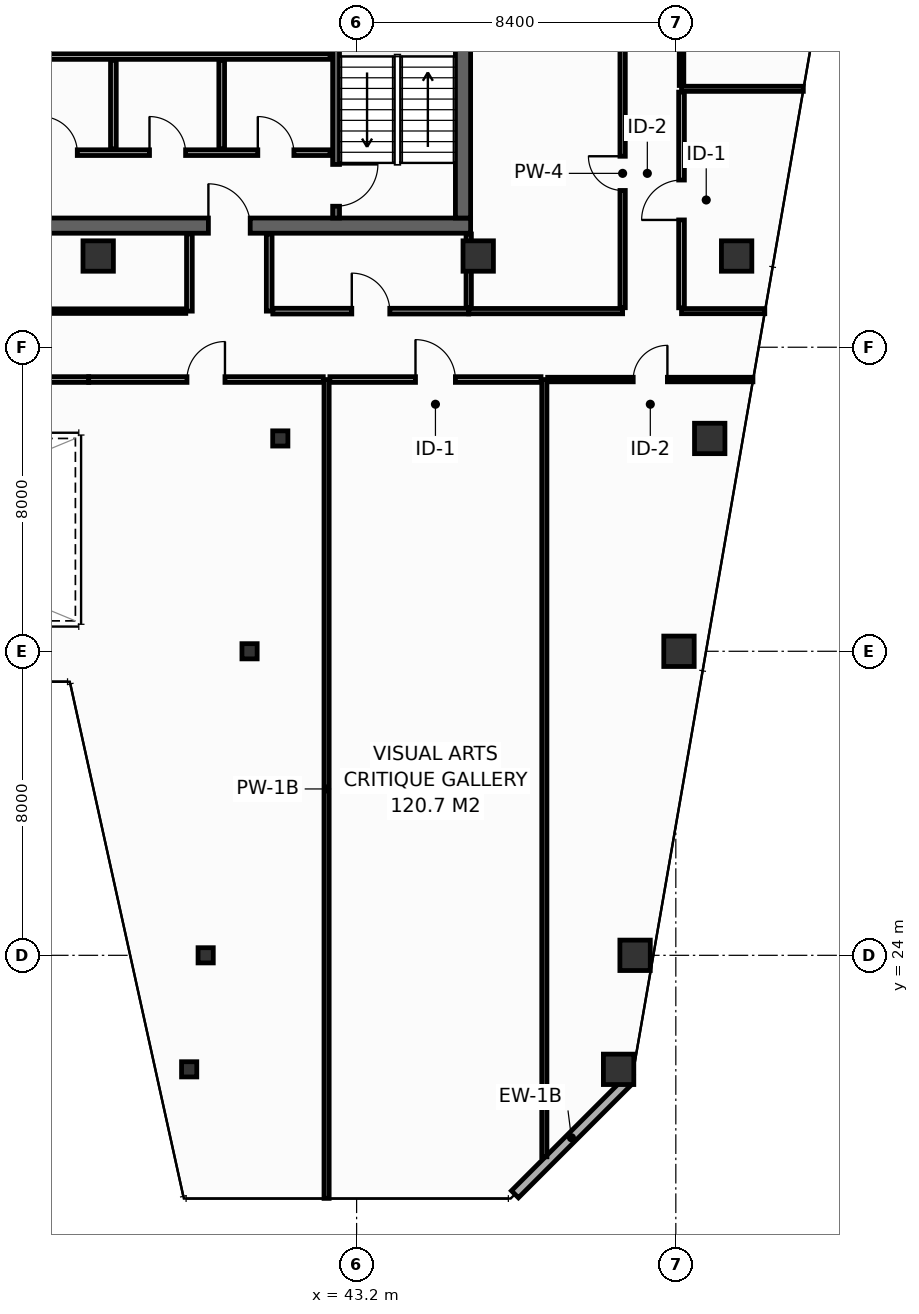
"""IFC4 building model, lengths in metres.
Left out: names, types, materials, properties, quantities, classifications, styles, units other than length and angle.
Written with IfcOpenShell. Run it as: python <this file> out.ifc"""

import sys

from ifc_helpers import new_model, si_unit, direction, frame, frame_2d, origin, origin_2d, place, context, subcontext, project, spatial, rectangle, hollow_rectangle, extrude, element, fill, save


model = new_model("IFC4")
c1 = context("Model", 3, precision=1e-05, world=origin(), true_north=direction((0.0, 1.0)))
c2 = subcontext(c1, "Body", "Model", "MODEL_VIEW")
j1 = project(units=[si_unit("LENGTHUNIT", "METRE"), si_unit("PLANEANGLEUNIT", "RADIAN")], contexts=[c1])
p1 = place(None, origin())
s1 = spatial("IfcSite", under=j1, at=p1, CompositionType="ELEMENT")
p2 = place(p1, origin())
s2 = spatial("IfcBuilding", under=s1, at=p2, CompositionType="ELEMENT")
p3 = place(p2, frame((0.0, 0.0, 234.4)))
s3 = spatial("IfcBuildingStorey", under=s2, at=p3, CompositionType="ELEMENT", Elevation=234.4)
p4 = place(p3, frame((13.7, 43.2, 0.0), z_axis=(0.0, 0.0, 1.0), x_axis=(1.0, 0.0, 0.0)))
e1 = element("IfcWall", 1, at=p4, inside=s3, PredefinedType="SHEAR", context=c2, shape_type="SweptSolid", body=[
    extrude(rectangle(XDim=32.5, YDim=0.4, at=frame_2d((16.25, 0.0))), origin(), (0.0, 0.0, 1.0), 3.55),
])
p5 = place(p4, frame((5.4, 0.0, 0.0)))
e2 = element("IfcOpeningElement", 2, at=p5, cuts=e1, PredefinedType="OPENING", context=c2, shape_type="SweptSolid", body=[
    extrude(rectangle(XDim=1.1, YDim=2.15, at=frame_2d((0.55, 1.075))), frame((0.0, 0.21, 0.0), z_axis=(0.0, -1.0, 0.0), x_axis=(1.0, 0.0, 0.0)), (0.0, 0.0, 1.0), 0.42),
])
p6 = place(p4, frame((25.6, 0.0, 0.0)))
e3 = element("IfcOpeningElement", 3, at=p6, cuts=e1, PredefinedType="OPENING", context=c2, shape_type="SweptSolid", body=[
    extrude(rectangle(XDim=1.1, YDim=2.15, at=frame_2d((0.55, 1.075))), frame((0.0, 0.21, 0.0), z_axis=(0.0, -1.0, 0.0), x_axis=(1.0, 0.0, 0.0)), (0.0, 0.0, 1.0), 0.42),
])
p7 = place(p3, frame((46.0, 43.4, 0.0), z_axis=(0.0, 0.0, 1.0), x_axis=(0.0, 1.0, 0.0)))
e4 = element("IfcWall", 4, at=p7, inside=s3, PredefinedType="SHEAR", context=c2, shape_type="SweptSolid", body=[
    extrude(rectangle(XDim=10.4, YDim=0.4, at=frame_2d((5.2, 0.0))), origin(), (0.0, 0.0, 1.0), 3.55),
])
for number, where, z_axis, x_axis in (
    (5, (36.4, 42.4, 0.0), (0.0, 0.0, 1.0), (1.0, 0.0, 0.0)),
    (6, (46.4, 42.4, 0.0), (0.0, 0.0, 1.0), (1.0, 0.0, 0.0)),
    (7, (53.2, 42.4, 0.0), (0.0, 0.0, 1.0), (1.0, 0.0, 0.0)),
    (8, (50.094, 21.0, 0.0), (0.0, 0.0, 1.0), (1.0, 0.0, 0.0)),
):
    element("IfcColumn", number, at=place(p3, frame(where, z_axis=z_axis, x_axis=x_axis)), inside=s3, PredefinedType="COLUMN", context=c2, shape_type="SweptSolid", body=[
        extrude(hollow_rectangle(XDim=0.8, YDim=0.8, WallThickness=0.036, at=origin_2d()), origin(), (0.0, 0.0, 1.0), 3.8),
    ])
p8 = place(p3, frame((38.794, 21.0, 0.0), z_axis=(0.0, 0.0, 1.0), x_axis=(1.0, 0.0, 0.0)))
e9 = element("IfcColumn", 9, at=p8, inside=s3, PredefinedType="COLUMN", context=c2, shape_type="SweptSolid", body=[
    extrude(hollow_rectangle(XDim=0.4, YDim=0.4, WallThickness=0.016, at=origin_2d()), origin(), (0.0, 0.0, 1.0), 3.8),
])
p9 = place(p3, frame((50.528, 24.0, 0.0), z_axis=(0.0, 0.0, 1.0), x_axis=(1.0, 0.0, 0.0)))
e10 = element("IfcColumn", 10, at=p9, inside=s3, PredefinedType="COLUMN", context=c2, shape_type="SweptSolid", body=[
    extrude(hollow_rectangle(XDim=0.8, YDim=0.8, WallThickness=0.036, at=origin_2d()), origin(), (0.0, 0.0, 1.0), 3.8),
])
p10 = place(p3, frame((39.228, 24.0, 0.0), z_axis=(0.0, 0.0, 1.0), x_axis=(1.0, 0.0, 0.0)))
e11 = element("IfcColumn", 11, at=p10, inside=s3, PredefinedType="COLUMN", context=c2, shape_type="SweptSolid", body=[
    extrude(hollow_rectangle(XDim=0.4, YDim=0.4, WallThickness=0.016, at=origin_2d()), origin(), (0.0, 0.0, 1.0), 3.8),
])
p11 = place(p3, frame((51.683, 32.0, 0.0), z_axis=(0.0, 0.0, 1.0), x_axis=(1.0, 0.0, 0.0)))
e12 = element("IfcColumn", 12, at=p11, inside=s3, PredefinedType="COLUMN", context=c2, shape_type="SweptSolid", body=[
    extrude(hollow_rectangle(XDim=0.8, YDim=0.8, WallThickness=0.036, at=origin_2d()), origin(), (0.0, 0.0, 1.0), 3.8),
])
p12 = place(p3, frame((40.383, 32.0, 0.0), z_axis=(0.0, 0.0, 1.0), x_axis=(1.0, 0.0, 0.0)))
e13 = element("IfcColumn", 13, at=p12, inside=s3, PredefinedType="COLUMN", context=c2, shape_type="SweptSolid", body=[
    extrude(hollow_rectangle(XDim=0.4, YDim=0.4, WallThickness=0.016, at=origin_2d()), origin(), (0.0, 0.0, 1.0), 3.8),
])
p13 = place(p3, frame((52.492, 37.6, 0.0), z_axis=(0.0, 0.0, 1.0), x_axis=(1.0, 0.0, 0.0)))
e14 = element("IfcColumn", 14, at=p13, inside=s3, PredefinedType="COLUMN", context=c2, shape_type="SweptSolid", body=[
    extrude(hollow_rectangle(XDim=0.8, YDim=0.8, WallThickness=0.036, at=origin_2d()), origin(), (0.0, 0.0, 1.0), 3.8),
])
p14 = place(p3, frame((41.192, 37.6, 0.0), z_axis=(0.0, 0.0, 1.0), x_axis=(1.0, 0.0, 0.0)))
e15 = element("IfcColumn", 15, at=p14, inside=s3, PredefinedType="COLUMN", context=c2, shape_type="SweptSolid", body=[
    extrude(hollow_rectangle(XDim=0.4, YDim=0.4, WallThickness=0.016, at=origin_2d()), origin(), (0.0, 0.0, 1.0), 3.8),
])
p15 = place(p3, frame((42.66, 53.8, 0.0), z_axis=(0.0, 0.0, 1.0), x_axis=(0.0, -1.0, 0.0)))
e16 = element("IfcWall", 16, at=p15, inside=s3, PredefinedType="SHEAR", context=c2, shape_type="SweptSolid", body=[
    extrude(rectangle(XDim=10.4, YDim=0.18, at=frame_2d((5.2, 0.0))), origin(), (0.0, 0.0, 1.0), 3.55),
])
p16 = place(p15, frame((8.99, 0.0, 0.0)))
e17 = element("IfcOpeningElement", 17, at=p16, cuts=e16, PredefinedType="OPENING", context=c2, shape_type="SweptSolid", body=[
    extrude(rectangle(XDim=1.1, YDim=2.15, at=frame_2d((0.55, 1.075))), frame((0.0, 0.1, 0.0), z_axis=(0.0, -1.0, 0.0), x_axis=(1.0, 0.0, 0.0)), (0.0, 0.0, 1.0), 0.2),
])
p17 = place(p3, frame((33.95, 45.12, 0.0), z_axis=(0.0, 0.0, 1.0), x_axis=(1.0, 0.0, 0.0)))
e18 = element("IfcWall", 18, at=p17, inside=s3, PredefinedType="PARTITIONING", context=c2, shape_type="SweptSolid", body=[
    extrude(rectangle(XDim=8.55, YDim=0.15, at=frame_2d((4.275, 0.0))), origin(), (0.0, 0.0, 1.0), 3.55),
])
p18 = place(p17, frame((0.95, 0.0, 0.0)))
e19 = element("IfcOpeningElement", 19, at=p18, cuts=e18, PredefinedType="OPENING", context=c2, shape_type="SweptSolid", body=[
    extrude(rectangle(XDim=0.95, YDim=2.15, at=frame_2d((0.475, 1.075))), frame((0.0, 0.085, 0.0), z_axis=(0.0, -1.0, 0.0), x_axis=(1.0, 0.0, 0.0)), (0.0, 0.0, 1.0), 0.17),
])
p19 = place(p17, frame((3.8, 0.0, 0.0)))
e20 = element("IfcOpeningElement", 20, at=p19, cuts=e18, PredefinedType="OPENING", context=c2, shape_type="SweptSolid", body=[
    extrude(rectangle(XDim=0.95, YDim=2.15, at=frame_2d((0.475, 1.075))), frame((0.0, 0.085, 0.0), z_axis=(0.0, -1.0, 0.0), x_axis=(1.0, 0.0, 0.0)), (0.0, 0.0, 1.0), 0.17),
])
p20 = place(p17, frame((6.65, 0.0, 0.0)))
e21 = element("IfcOpeningElement", 21, at=p20, cuts=e18, PredefinedType="OPENING", context=c2, shape_type="SweptSolid", body=[
    extrude(rectangle(XDim=0.95, YDim=2.15, at=frame_2d((0.475, 1.075))), frame((0.0, 0.085, 0.0), z_axis=(0.0, -1.0, 0.0), x_axis=(1.0, 0.0, 0.0)), (0.0, 0.0, 1.0), 0.17),
])
p21 = place(p3, frame((33.95, 47.65, 0.0), z_axis=(0.0, 0.0, 1.0), x_axis=(1.0, 0.0, 0.0)))
e22 = element("IfcWall", 22, at=p21, inside=s3, PredefinedType="PARTITIONING", context=c2, shape_type="SweptSolid", body=[
    extrude(rectangle(XDim=8.55, YDim=0.15, at=frame_2d((4.275, 0.0))), origin(), (0.0, 0.0, 1.0), 3.55),
])
for number, where, z_axis, x_axis in (
    (23, (36.8, 45.22, 0.0), (0.0, 0.0, 1.0), (0.0, 1.0, 0.0)),
    (24, (39.65, 45.22, 0.0), (0.0, 0.0, 1.0), (0.0, 1.0, 0.0)),
):
    element("IfcWall", number, at=place(p3, frame(where, z_axis=z_axis, x_axis=x_axis)), inside=s3, PredefinedType="PARTITIONING", context=c2, shape_type="SweptSolid", body=[
        extrude(rectangle(XDim=2.33, YDim=0.15, at=frame_2d((1.165, 0.0))), origin(), (0.0, 0.0, 1.0), 3.55),
    ])
p22 = place(p3, frame((47.366, 17.713, 0.0), z_axis=(0.0, 0.0, 1.0), x_axis=(0.70707775441, 0.707135806771, 0.0)))
e25 = element("IfcWall", 25, at=p22, inside=s3, PredefinedType="STANDARD", context=c2, shape_type="SweptSolid", body=[
    extrude(rectangle(XDim=4.206, YDim=0.26, at=frame_2d((2.103, 0.0))), origin(), (0.0, 0.0, 1.0), 3.55),
])
p23 = place(p3, frame((46.15, 40.95, 0.0), z_axis=(0.0, 0.0, 1.0), x_axis=(1.0, 0.0, 0.0)))
e26 = element("IfcWall", 26, at=p23, inside=s3, PredefinedType="PARTITIONING", context=c2, shape_type="SweptSolid", body=[
    extrude(rectangle(XDim=4.05, YDim=0.14, at=frame_2d((2.025, 0.0))), origin(), (0.0, 0.0, 1.0), 3.55),
])
p24 = place(p3, frame((46.15, 41.04, 0.0), z_axis=(0.0, 0.0, 1.0), x_axis=(0.0, 1.0, 0.0)))
e27 = element("IfcWall", 27, at=p24, inside=s3, PredefinedType="PARTITIONING", context=c2, shape_type="SweptSolid", body=[
    extrude(rectangle(XDim=1.94, YDim=0.14, at=frame_2d((0.97, 0.0))), origin(), (0.0, 0.0, 1.0), 3.55),
])
p25 = place(p3, frame((50.2, 41.04, 0.0), z_axis=(0.0, 0.0, 1.0), x_axis=(0.0, 1.0, 0.0)))
e28 = element("IfcWall", 28, at=p25, inside=s3, PredefinedType="PARTITIONING", context=c2, shape_type="SweptSolid", body=[
    extrude(rectangle(XDim=7.07, YDim=0.14, at=frame_2d((3.535, 0.0))), origin(), (0.0, 0.0, 1.0), 2.947),
])
p26 = place(p25, frame((3.085, 0.0, 0.0)))
e29 = element("IfcOpeningElement", 29, at=p26, cuts=e28, PredefinedType="OPENING", context=c2, shape_type="SweptSolid", body=[
    extrude(rectangle(XDim=0.9, YDim=2.1, at=frame_2d((0.45, 1.05))), frame((0.0, 0.08, 0.0), z_axis=(0.0, -1.0, 0.0), x_axis=(1.0, 0.0, 0.0)), (0.0, 0.0, 1.0), 0.16),
])
p27 = place(p3, frame((51.75, 40.95, 0.0), z_axis=(0.0, 0.0, 1.0), x_axis=(1.0, 0.0, 0.0)))
e30 = element("IfcWall", 30, at=p27, inside=s3, PredefinedType="PARTITIONING", context=c2, shape_type="SweptSolid", body=[
    extrude(rectangle(XDim=2.191, YDim=0.135, at=frame_2d((1.095, 0.0))), origin(), (0.0, 0.0, 1.0), 3.085),
])
p28 = place(p3, frame((51.75, 46.8, 0.0), z_axis=(0.0, 0.0, 1.0), x_axis=(1.0, 0.0, 0.0)))
e31 = element("IfcWall", 31, at=p28, inside=s3, PredefinedType="PARTITIONING", context=c2, shape_type="SweptSolid", body=[
    extrude(rectangle(XDim=3.205, YDim=0.135, at=frame_2d((1.603, 0.0))), origin(), (0.0, 0.0, 1.0), 2.947),
])
p29 = place(p3, frame((51.75, 41.038, 0.0), z_axis=(0.0, 0.0, 1.0), x_axis=(0.0, 1.0, 0.0)))
e32 = element("IfcWall", 32, at=p29, inside=s3, PredefinedType="PARTITIONING", context=c2, shape_type="SweptSolid", body=[
    extrude(rectangle(XDim=5.675, YDim=0.15, at=frame_2d((2.837, 0.0))), origin(), (0.0, 0.0, 1.0), 2.947),
])
p30 = place(p29, frame((2.312, 0.0, 0.0)))
e33 = element("IfcOpeningElement", 33, at=p30, cuts=e32, PredefinedType="OPENING", context=c2, shape_type="SweptSolid", body=[
    extrude(rectangle(XDim=1.05, YDim=2.15, at=frame_2d((0.525, 1.075))), frame((0.0, 0.085, 0.0), z_axis=(0.0, -1.0, 0.0), x_axis=(1.0, 0.0, 0.0)), (0.0, 0.0, 1.0), 0.17),
])
p31 = place(p3, frame((51.75, 46.887, 0.0), z_axis=(0.0, 0.0, 1.0), x_axis=(0.0, 1.0, 0.0)))
e34 = element("IfcWall", 34, at=p31, inside=s3, PredefinedType="PARTITIONING", context=c2, shape_type="SweptSolid", body=[
    extrude(rectangle(XDim=4.425, YDim=0.12, at=frame_2d((2.212, 0.0))), origin(), (0.0, 0.0, 1.0), 3.55),
])
p32 = place(p31, frame((1.762, 0.0, 0.0)))
e35 = element("IfcOpeningElement", 35, at=p32, cuts=e34, PredefinedType="OPENING", context=c2, shape_type="SweptSolid", body=[
    extrude(rectangle(XDim=0.9, YDim=2.1, at=frame_2d((0.45, 1.05))), frame((0.0, 0.07, 0.0), z_axis=(0.0, -1.0, 0.0), x_axis=(1.0, 0.0, 0.0)), (0.0, 0.0, 1.0), 0.14),
])
for number, where, z_axis, x_axis in (
    (36, (38.8, 40.95, 0.0), (0.0, 0.0, 1.0), (0.0, 1.0, 0.0)),
    (37, (40.9, 40.95, 0.0), (0.0, 0.0, 1.0), (0.0, 1.0, 0.0)),
):
    element("IfcWall", number, at=place(p3, frame(where, z_axis=z_axis, x_axis=x_axis)), inside=s3, PredefinedType="PARTITIONING", context=c2, shape_type="SweptSolid", body=[
        extrude(rectangle(XDim=2.03, YDim=0.15, at=frame_2d((1.015, 0.0))), origin(), (0.0, 0.0, 1.0), 3.55),
    ])
p33 = place(p3, frame((30.08, 40.95, 0.0), z_axis=(0.0, 0.0, 1.0), x_axis=(1.0, 0.0, 0.0)))
e38 = element("IfcWall", 38, at=p33, inside=s3, PredefinedType="PARTITIONING", context=c2, shape_type="SweptSolid", body=[
    extrude(rectangle(XDim=8.625, YDim=0.12, at=frame_2d((4.312, 0.0))), origin(), (0.0, 0.0, 1.0), 2.947),
])
p34 = place(p33, frame((3.862, 0.0, 0.0)))
e39 = element("IfcOpeningElement", 39, at=p34, cuts=e38, PredefinedType="OPENING", context=c2, shape_type="SweptSolid", body=[
    extrude(rectangle(XDim=0.9, YDim=2.1, at=frame_2d((0.45, 1.05))), frame((0.0, 0.07, 0.0), z_axis=(0.0, -1.0, 0.0), x_axis=(1.0, 0.0, 0.0)), (0.0, 0.0, 1.0), 0.14),
])
p35 = place(p3, frame((40.995, 40.95, 0.0), z_axis=(0.0, 0.0, 1.0), x_axis=(1.0, 0.0, 0.0)))
e40 = element("IfcWall", 40, at=p35, inside=s3, PredefinedType="PARTITIONING", context=c2, shape_type="SweptSolid", body=[
    extrude(rectangle(XDim=5.155, YDim=0.15, at=frame_2d((2.577, 0.0))), origin(), (0.0, 0.0, 1.0), 3.55),
])
p36 = place(p35, frame((2.078, 0.0, 0.0)))
e41 = element("IfcOpeningElement", 41, at=p36, cuts=e40, PredefinedType="OPENING", context=c2, shape_type="SweptSolid", body=[
    extrude(rectangle(XDim=1.0, YDim=2.15, at=frame_2d((0.5, 1.075))), frame((0.0, 0.085, 0.0), z_axis=(0.0, -1.0, 0.0), x_axis=(1.0, 0.0, 0.0)), (0.0, 0.0, 1.0), 0.17),
])
p37 = place(p3, frame((42.41, 17.605, 0.0), z_axis=(0.0, 0.0, 1.0), x_axis=(0.0, 1.0, 0.0)))
e42 = element("IfcWall", 42, at=p37, inside=s3, PredefinedType="PARTITIONING", context=c2, shape_type="SweptSolid", body=[
    extrude(rectangle(XDim=21.545, YDim=0.135, at=frame_2d((10.772, 0.0))), origin(), (0.0, 0.0, 1.0), 2.947),
])
p38 = place(p3, frame((48.14, 18.699, 0.0), z_axis=(0.0, 0.0, 1.0), x_axis=(0.0, 1.0, 0.0)))
e43 = element("IfcWall", 43, at=p38, inside=s3, PredefinedType="PARTITIONING", context=c2, shape_type="SweptSolid", body=[
    extrude(rectangle(XDim=20.451, YDim=0.135, at=frame_2d((10.226, 0.0))), origin(), (0.0, 0.0, 1.0), 2.947),
])
p39 = place(p3, frame((23.85, 39.15, 0.0), z_axis=(0.0, 0.0, 1.0), x_axis=(1.0, 0.0, 0.0)))
e44 = element("IfcWall", 44, at=p39, inside=s3, PredefinedType="PARTITIONING", context=c2, shape_type="SweptSolid", body=[
    extrude(rectangle(XDim=12.3, YDim=0.15, at=frame_2d((6.15, 0.0))), origin(), (0.0, 0.0, 1.0), 3.55),
])
p40 = place(p3, frame((36.15, 39.15, 0.0), z_axis=(0.0, 0.0, 1.0), x_axis=(1.0, 0.0, 0.0)))
e45 = element("IfcWall", 45, at=p40, inside=s3, PredefinedType="PARTITIONING", context=c2, shape_type="SweptSolid", body=[
    extrude(rectangle(XDim=6.173, YDim=0.15, at=frame_2d((3.086, 0.0))), origin(), (0.0, 0.0, 1.0), 2.947),
])
p41 = place(p40, frame((2.586, 0.0, 0.0)))
e46 = element("IfcOpeningElement", 46, at=p41, cuts=e45, PredefinedType="OPENING", context=c2, shape_type="SweptSolid", body=[
    extrude(rectangle(XDim=1.0, YDim=2.15, at=frame_2d((0.5, 1.075))), frame((0.0, 0.085, 0.0), z_axis=(0.0, -1.0, 0.0), x_axis=(1.0, 0.0, 0.0)), (0.0, 0.0, 1.0), 0.17),
])
p42 = place(p3, frame((42.498, 39.15, 0.0), z_axis=(0.0, 0.0, 1.0), x_axis=(1.0, 0.0, 0.0)))
e47 = element("IfcWall", 47, at=p42, inside=s3, PredefinedType="PARTITIONING", context=c2, shape_type="SweptSolid", body=[
    extrude(rectangle(XDim=5.555, YDim=0.15, at=frame_2d((2.777, 0.0))), origin(), (0.0, 0.0, 1.0), 3.55),
])
p43 = place(p42, frame((2.252, 0.0, 0.0)))
e48 = element("IfcOpeningElement", 48, at=p43, cuts=e47, PredefinedType="OPENING", context=c2, shape_type="SweptSolid", body=[
    extrude(rectangle(XDim=1.05, YDim=2.15, at=frame_2d((0.525, 1.075))), frame((0.0, 0.085, 0.0), z_axis=(0.0, -1.0, 0.0), x_axis=(1.0, 0.0, 0.0)), (0.0, 0.0, 1.0), 0.17),
])
p44 = place(p3, frame((48.228, 39.15, 0.0), z_axis=(0.0, 0.0, 1.0), x_axis=(1.0, 0.0, 0.0)))
e49 = element("IfcWall", 49, at=p44, inside=s3, PredefinedType="PARTITIONING", context=c2, shape_type="SweptSolid", body=[
    extrude(rectangle(XDim=5.401, YDim=0.12, at=frame_2d((2.701, 0.0))), origin(), (0.0, 0.0, 1.0), 3.085),
])
p45 = place(p44, frame((2.251, 0.0, 0.0)))
e50 = element("IfcOpeningElement", 50, at=p45, cuts=e49, PredefinedType="OPENING", context=c2, shape_type="SweptSolid", body=[
    extrude(rectangle(XDim=0.9, YDim=2.1, at=frame_2d((0.45, 1.05))), frame((0.0, 0.07, 0.0), z_axis=(0.0, -1.0, 0.0), x_axis=(1.0, 0.0, 0.0)), (0.0, 0.0, 1.0), 0.14),
])
p46 = place(p16, origin())
e51 = element("IfcDoor", 51, at=p46, inside=s3, OperationType="SINGLE_SWING_LEFT", PredefinedType="DOOR", context=c2, shape_type="SweptSolid", body=[
    extrude(rectangle(XDim=1.1, YDim=2.15, at=frame_2d((0.55, 1.075))), frame((0.0, 0.025, 0.0), z_axis=(0.0, -1.0, 0.0), x_axis=(1.0, 0.0, 0.0)), (0.0, 0.0, 1.0), 0.05),
])
fill(e17, e51)
p47 = place(p6, origin())
e52 = element("IfcDoor", 52, at=p47, inside=s3, OperationType="SINGLE_SWING_LEFT", PredefinedType="DOOR", context=c2, shape_type="SweptSolid", body=[
    extrude(rectangle(XDim=1.1, YDim=2.15, at=frame_2d((0.55, 1.075))), frame((0.0, 0.025, 0.0), z_axis=(0.0, -1.0, 0.0), x_axis=(1.0, 0.0, 0.0)), (0.0, 0.0, 1.0), 0.05),
])
fill(e3, e52)
p48 = place(p18, origin())
e53 = element("IfcDoor", 53, at=p48, inside=s3, OperationType="SINGLE_SWING_LEFT", PredefinedType="DOOR", context=c2, shape_type="SweptSolid", body=[
    extrude(rectangle(XDim=0.95, YDim=2.15, at=frame_2d((0.475, 1.075))), frame((0.0, 0.025, 0.0), z_axis=(0.0, -1.0, 0.0), x_axis=(1.0, 0.0, 0.0)), (0.0, 0.0, 1.0), 0.05),
])
fill(e19, e53)
p49 = place(p19, origin())
e54 = element("IfcDoor", 54, at=p49, inside=s3, OperationType="SINGLE_SWING_LEFT", PredefinedType="DOOR", context=c2, shape_type="SweptSolid", body=[
    extrude(rectangle(XDim=0.95, YDim=2.15, at=frame_2d((0.475, 1.075))), frame((0.0, 0.025, 0.0), z_axis=(0.0, -1.0, 0.0), x_axis=(1.0, 0.0, 0.0)), (0.0, 0.0, 1.0), 0.05),
])
fill(e20, e54)
p50 = place(p20, origin())
e55 = element("IfcDoor", 55, at=p50, inside=s3, OperationType="SINGLE_SWING_LEFT", PredefinedType="DOOR", context=c2, shape_type="SweptSolid", body=[
    extrude(rectangle(XDim=0.95, YDim=2.15, at=frame_2d((0.475, 1.075))), frame((0.0, 0.025, 0.0), z_axis=(0.0, -1.0, 0.0), x_axis=(1.0, 0.0, 0.0)), (0.0, 0.0, 1.0), 0.05),
])
fill(e21, e55)
p51 = place(p26, origin())
e56 = element("IfcDoor", 56, at=p51, inside=s3, OperationType="SINGLE_SWING_RIGHT", PredefinedType="DOOR", context=c2, shape_type="SweptSolid", body=[
    extrude(rectangle(XDim=0.9, YDim=2.1, at=frame_2d((0.45, 1.05))), frame((0.0, 0.025, 0.0), z_axis=(0.0, -1.0, 0.0), x_axis=(1.0, 0.0, 0.0)), (0.0, 0.0, 1.0), 0.05),
])
fill(e29, e56)
p52 = place(p30, origin())
e57 = element("IfcDoor", 57, at=p52, inside=s3, OperationType="SINGLE_SWING_LEFT", PredefinedType="DOOR", context=c2, shape_type="SweptSolid", body=[
    extrude(rectangle(XDim=1.05, YDim=2.15, at=frame_2d((0.525, 1.075))), frame((0.0, 0.025, 0.0), z_axis=(0.0, -1.0, 0.0), x_axis=(1.0, 0.0, 0.0)), (0.0, 0.0, 1.0), 0.05),
])
fill(e33, e57)
p53 = place(p36, origin())
e58 = element("IfcDoor", 58, at=p53, inside=s3, OperationType="SINGLE_SWING_LEFT", PredefinedType="DOOR", context=c2, shape_type="SweptSolid", body=[
    extrude(rectangle(XDim=1.0, YDim=2.15, at=frame_2d((0.5, 1.075))), frame((0.0, 0.025, 0.0), z_axis=(0.0, -1.0, 0.0), x_axis=(1.0, 0.0, 0.0)), (0.0, 0.0, 1.0), 0.05),
])
fill(e41, e58)
p54 = place(p41, origin())
e59 = element("IfcDoor", 59, at=p54, inside=s3, OperationType="SINGLE_SWING_RIGHT", PredefinedType="DOOR", context=c2, shape_type="SweptSolid", body=[
    extrude(rectangle(XDim=1.0, YDim=2.15, at=frame_2d((0.5, 1.075))), frame((0.0, 0.025, 0.0), z_axis=(0.0, -1.0, 0.0), x_axis=(1.0, 0.0, 0.0)), (0.0, 0.0, 1.0), 0.05),
])
fill(e46, e59)
p55 = place(p43, origin())
e60 = element("IfcDoor", 60, at=p55, inside=s3, OperationType="SINGLE_SWING_LEFT", PredefinedType="DOOR", context=c2, shape_type="SweptSolid", body=[
    extrude(rectangle(XDim=1.05, YDim=2.15, at=frame_2d((0.525, 1.075))), frame((0.0, 0.025, 0.0), z_axis=(0.0, -1.0, 0.0), x_axis=(1.0, 0.0, 0.0)), (0.0, 0.0, 1.0), 0.05),
])
fill(e48, e60)
p56 = place(p45, origin())
e61 = element("IfcDoor", 61, at=p56, inside=s3, OperationType="SINGLE_SWING_RIGHT", PredefinedType="DOOR", context=c2, shape_type="SweptSolid", body=[
    extrude(rectangle(XDim=0.9, YDim=2.1, at=frame_2d((0.45, 1.05))), frame((0.0, 0.025, 0.0), z_axis=(0.0, -1.0, 0.0), x_axis=(1.0, 0.0, 0.0)), (0.0, 0.0, 1.0), 0.05),
])
fill(e50, e61)
save(model, sys.argv[1])
